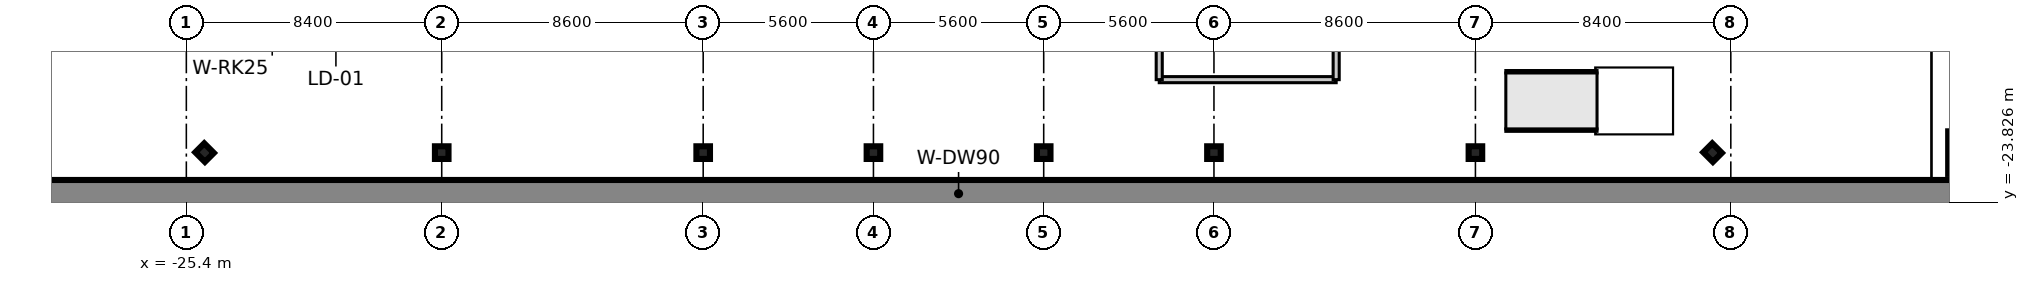
"""IFC4 building model, lengths in metres.
Left out: names, types, materials, properties, quantities, classifications, styles, units other than length and angle.
Written with IfcOpenShell. Run it as: python <this file> out.ifc"""

import sys

from ifc_helpers import new_model, si_unit, direction, frame, frame_2d, origin, origin_2d, place, context, subcontext, project, spatial, rectangle, i_section, extrude, source, transform, mapped, element, save


model = new_model("IFC4")
c1 = context("Model", 3, precision=1e-05, world=origin(), true_north=direction((0.0, 1.0)))
c2 = subcontext(c1, "Body", "Model", "MODEL_VIEW")
j1 = project(units=[si_unit("LENGTHUNIT", "METRE"), si_unit("PLANEANGLEUNIT", "RADIAN")], contexts=[c1])
p1 = place(None, origin())
s1 = spatial("IfcSite", under=j1, at=p1, CompositionType="ELEMENT")
p2 = place(p1, origin())
s2 = spatial("IfcBuilding", under=s1, at=p2, CompositionType="ELEMENT")
p3 = place(p2, frame((0.0, 0.0, -10.8)))
s3 = spatial("IfcBuildingStorey", under=s2, at=p3, CompositionType="ELEMENT", Elevation=-10.8)
m1 = source(origin(), c2, "Body", "SweptSolid", [
    extrude(rectangle(XDim=76.0, YDim=0.9, at=frame_2d((38.0, 0.0))), origin(), (0.0, 0.0, 1.0), 4.98),
])
p4 = place(p3, frame((-38.0, -23.55, 0.0), z_axis=(0.0, 0.0, 1.0), x_axis=(1.0, 0.0, 0.0)))
e1 = element("IfcWall", 1, at=p4, inside=s3, PredefinedType="SHEAR", context=c2, shape_type="MappedRepresentation", body=[
    mapped(m1, transform((0.0, 0.0, 0.0), scale=1.0)),
])
m2 = source(origin(), c2, "Body", "SweptSolid", [
    extrude(rectangle(XDim=0.9, YDim=1.4, at=origin_2d()), origin(), (0.0, 0.0, 1.0), 5.355),
])
p5 = place(p3, frame((33.0, -22.2, 0.0), z_axis=(0.0, 0.0, 1.0), x_axis=(1.0, 0.0, 0.0)))
e2 = element("IfcColumn", 2, at=p5, inside=s3, PredefinedType="PILASTER", context=c2, shape_type="MappedRepresentation", body=[
    mapped(m2, transform((0.0, 0.0, 0.0), scale=1.0)),
])
m3 = source(origin(), c2, "Body", "SweptSolid", [
    extrude(i_section(OverallWidth=0.416, OverallDepth=0.446, WebThickness=0.025, FlangeThickness=0.04, at=origin_2d()), origin(), (0.0, 0.0, 1.0), 5.355),
])
for number, where, z_axis, x_axis in (
    (3, (-17.0, -22.2, 0.0), (0.0, 0.0, 1.0), (0.0, 1.0, 0.0)),
    (4, (-8.4, -22.2, 0.0), (0.0, 0.0, 1.0), (0.0, 1.0, 0.0)),
    (5, (-2.8, -22.2, 0.0), (0.0, 0.0, 1.0), (0.0, 1.0, 0.0)),
    (6, (2.8, -22.2, 0.0), (0.0, 0.0, 1.0), (0.0, 1.0, 0.0)),
    (7, (8.4, -22.2, 0.0), (0.0, 0.0, 1.0), (0.0, 1.0, 0.0)),
    (8, (17.0, -22.2, 0.0), (0.0, 0.0, 1.0), (0.0, 1.0, 0.0)),
    (9, (-24.8, -22.2, 0.0), (0.0, 0.0, 1.0), (0.707, 0.707, 0.0)),
    (10, (24.8, -22.2, 0.0), (0.0, 0.0, 1.0), (0.707, 0.707, 0.0)),
):
    element("IfcColumn", number, at=place(p3, frame(where, z_axis=z_axis, x_axis=x_axis)), inside=s3, PredefinedType="COLUMN", context=c2, shape_type="MappedRepresentation", body=[
        mapped(m3, transform((0.0, 0.0, 0.0), scale=1.0)),
    ])
m4 = source(origin(), c2, "Body", "SweptSolid", [
    extrude(rectangle(XDim=5.82, YDim=0.2, at=frame_2d((2.91, 0.0))), origin(), (0.0, 0.0, 1.0), 3.4),
])
p6 = place(p3, frame((6.6, -19.8, 0.0), z_axis=(0.0, 0.0, 1.0), x_axis=(1.0, 0.0, 0.0)))
e11 = element("IfcWall", 11, at=p6, inside=s3, PredefinedType="PARTITIONING", context=c2, shape_type="MappedRepresentation", body=[
    mapped(m4, transform((0.0, 0.0, 0.0), scale=1.0)),
])
m5 = source(origin(), c2, "Body", "SweptSolid", [
    extrude(rectangle(XDim=4.03, YDim=0.2, at=frame_2d((2.015, 0.0))), origin(), (0.0, 0.0, 1.0), 3.4),
])
p7 = place(p3, frame((6.6, -19.8, 0.0), z_axis=(0.0, 0.0, 1.0), x_axis=(0.0, 1.0, 0.0)))
e12 = element("IfcWall", 12, at=p7, inside=s3, PredefinedType="PARTITIONING", context=c2, shape_type="MappedRepresentation", body=[
    mapped(m5, transform((0.0, 0.0, 0.0), scale=1.0)),
])
m6 = source(origin(), c2, "Body", "SweptSolid", [
    extrude(rectangle(XDim=5.1, YDim=0.2, at=frame_2d((2.55, 0.0))), origin(), (0.0, 0.0, 1.0), 3.4),
])
p8 = place(p3, frame((12.42, -19.8, 0.0), z_axis=(0.0, 0.0, 1.0), x_axis=(0.0, 1.0, 0.0)))
e13 = element("IfcWall", 13, at=p8, inside=s3, PredefinedType="PARTITIONING", context=c2, shape_type="MappedRepresentation", body=[
    mapped(m6, transform((0.0, 0.0, 0.0), scale=1.0)),
])
save(model, sys.argv[1])
